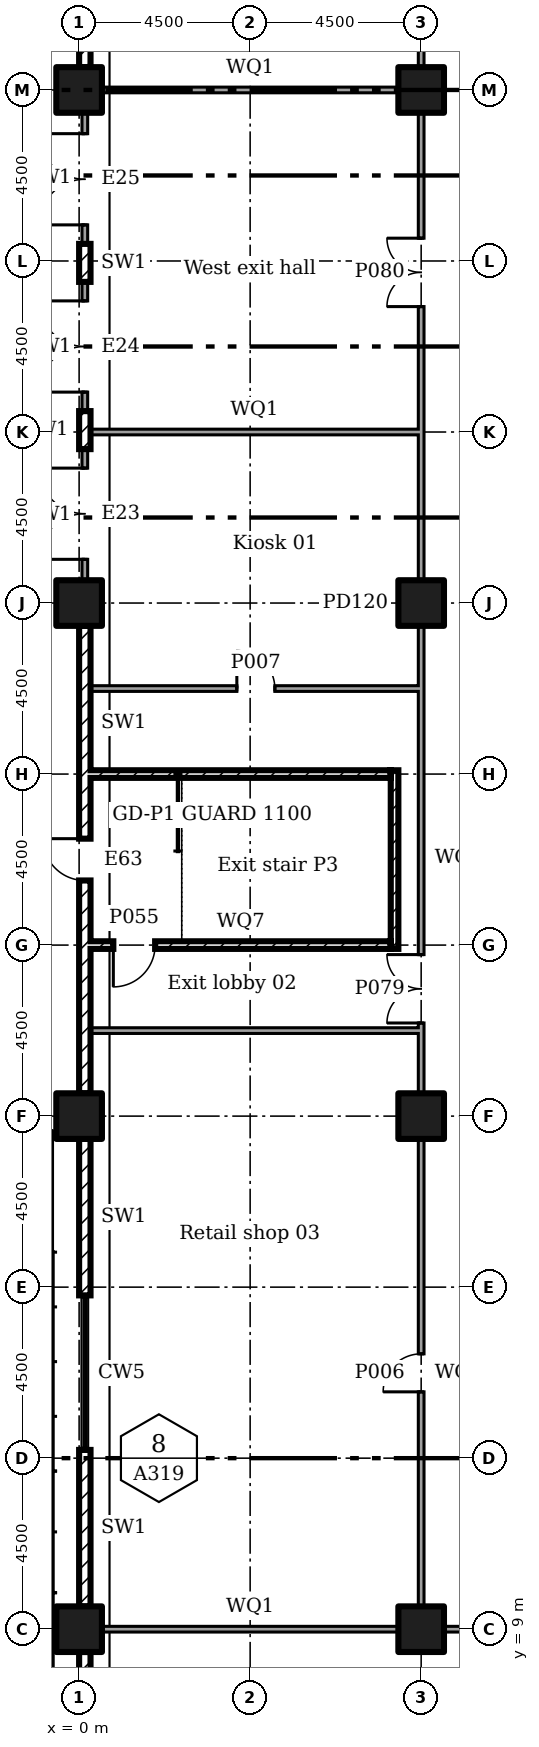
"""IFC4 building model, lengths in metres.
Left out: names, types, materials, properties, quantities, classifications, styles, units other than length and angle.
Written with IfcOpenShell. Run it as: python <this file> out.ifc"""

import sys

from ifc_helpers import new_model, si_unit, direction, frame, frame_2d, origin, origin_2d, place, context, subcontext, project, spatial, rectangle, extrude, element, fill, save


model = new_model("IFC4")
c1 = context("Model", 3, precision=1e-05, world=origin(), true_north=direction((0.0, 1.0)))
c2 = subcontext(c1, "Body", "Model", "MODEL_VIEW")
j1 = project(units=[si_unit("LENGTHUNIT", "METRE"), si_unit("PLANEANGLEUNIT", "RADIAN")], contexts=[c1])
p1 = place(None, origin())
s1 = spatial("IfcSite", under=j1, at=p1, CompositionType="ELEMENT")
p2 = place(p1, origin())
s2 = spatial("IfcBuilding", under=s1, at=p2, CompositionType="ELEMENT")
p3 = place(p2, origin())
s3 = spatial("IfcBuildingStorey", under=s2, at=p3, CompositionType="ELEMENT", Elevation=0.0)
for number, where in (
    (1, (0.0, 9.0, 0.0)),
    (2, (0.0, 22.5, 0.0)),
    (3, (0.0, 36.0, 0.0)),
    (4, (0.0, 49.5, 0.0)),
    (5, (9.0, 9.0, 0.0)),
    (6, (9.0, 22.5, 0.0)),
    (7, (9.0, 36.0, 0.0)),
    (8, (9.0, 49.5, 0.0)),
):
    element("IfcColumn", number, at=place(p3, frame(where)), inside=s3, PredefinedType="COLUMN", context=c2, shape_type="SweptSolid", body=[
        extrude(rectangle(XDim=1.2, YDim=1.2, at=origin_2d()), origin(), (0.0, 0.0, 1.0), 6.0),
    ])
p4 = place(p3, frame((0.15, 51.75, 0.0), z_axis=(0.0, 0.0, 1.0), x_axis=(0.0, -1.0, 0.0)))
e9 = element("IfcWall", 9, at=p4, inside=s3, PredefinedType="ELEMENTEDWALL", context=c2, shape_type="SweptSolid", body=[
    extrude(rectangle(XDim=1.65, YDim=0.3, at=frame_2d((0.825, 0.0))), origin(), (0.0, 0.0, 1.0), 5.55),
])
p5 = place(p3, frame((0.15, 48.9, 0.0), z_axis=(0.0, 0.0, 1.0), x_axis=(0.0, -1.0, 0.0)))
e10 = element("IfcWall", 10, at=p5, inside=s3, PredefinedType="SOLIDWALL", context=c2, shape_type="SweptSolid", body=[
    extrude(rectangle(XDim=3.45, YDim=0.15, at=frame_2d((1.725, 0.0))), origin(), (0.0, 0.0, 1.0), 5.55),
])
p6 = place(p5, frame((0.55, 0.0, 0.0)))
e11 = element("IfcOpeningElement", 11, at=p6, cuts=e10, PredefinedType="OPENING", context=c2, shape_type="SweptSolid", body=[
    extrude(rectangle(XDim=2.4, YDim=2.7, at=frame_2d((1.2, 1.35))), frame((0.0, 0.085, 0.0), z_axis=(0.0, -1.0, 0.0), x_axis=(1.0, 0.0, 0.0)), (0.0, 0.0, 1.0), 0.17),
])
p7 = place(p3, frame((0.15, 45.45, 0.0), z_axis=(0.0, 0.0, 1.0), x_axis=(0.0, -1.0, 0.0)))
e12 = element("IfcWall", 12, at=p7, inside=s3, PredefinedType="ELEMENTEDWALL", context=c2, shape_type="SweptSolid", body=[
    extrude(rectangle(XDim=1.0, YDim=0.3, at=frame_2d((0.5, 0.0))), origin(), (0.0, 0.0, 1.0), 5.55),
])
p8 = place(p3, frame((0.15, 44.45, 0.0), z_axis=(0.0, 0.0, 1.0), x_axis=(0.0, -1.0, 0.0)))
e13 = element("IfcWall", 13, at=p8, inside=s3, PredefinedType="SOLIDWALL", context=c2, shape_type="SweptSolid", body=[
    extrude(rectangle(XDim=3.4, YDim=0.15, at=frame_2d((1.7, 0.0))), origin(), (0.0, 0.0, 1.0), 5.55),
])
p9 = place(p8, frame((0.5, 0.0, 0.0)))
e14 = element("IfcOpeningElement", 14, at=p9, cuts=e13, PredefinedType="OPENING", context=c2, shape_type="SweptSolid", body=[
    extrude(rectangle(XDim=2.4, YDim=2.7, at=frame_2d((1.2, 1.35))), frame((0.0, 0.085, 0.0), z_axis=(0.0, -1.0, 0.0), x_axis=(1.0, 0.0, 0.0)), (0.0, 0.0, 1.0), 0.17),
])
p10 = place(p3, frame((0.15, 41.05, 0.0), z_axis=(0.0, 0.0, 1.0), x_axis=(0.0, -1.0, 0.0)))
e15 = element("IfcWall", 15, at=p10, inside=s3, PredefinedType="ELEMENTEDWALL", context=c2, shape_type="SweptSolid", body=[
    extrude(rectangle(XDim=1.0, YDim=0.3, at=frame_2d((0.5, 0.0))), origin(), (0.0, 0.0, 1.0), 5.55),
])
p11 = place(p3, frame((0.15, 40.05, 0.0), z_axis=(0.0, 0.0, 1.0), x_axis=(0.0, -1.0, 0.0)))
e16 = element("IfcWall", 16, at=p11, inside=s3, PredefinedType="SOLIDWALL", context=c2, shape_type="SweptSolid", body=[
    extrude(rectangle(XDim=3.45, YDim=0.15, at=frame_2d((1.725, 0.0))), origin(), (0.0, 0.0, 1.0), 5.55),
])
p12 = place(p11, frame((0.5, 0.0, 0.0)))
e17 = element("IfcOpeningElement", 17, at=p12, cuts=e16, PredefinedType="OPENING", context=c2, shape_type="SweptSolid", body=[
    extrude(rectangle(XDim=2.4, YDim=2.7, at=frame_2d((1.2, 1.35))), frame((0.0, 0.085, 0.0), z_axis=(0.0, -1.0, 0.0), x_axis=(1.0, 0.0, 0.0)), (0.0, 0.0, 1.0), 0.17),
])
p13 = place(p3, frame((0.15, 35.4, 0.0), z_axis=(0.0, 0.0, 1.0), x_axis=(0.0, -1.0, 0.0)))
e18 = element("IfcWall", 18, at=p13, inside=s3, PredefinedType="ELEMENTEDWALL", context=c2, shape_type="SweptSolid", body=[
    extrude(rectangle(XDim=5.1, YDim=0.3, at=frame_2d((2.55, 0.0))), origin(), (0.0, 0.0, 1.0), 5.55),
])
p14 = place(p3, frame((0.15, 30.3, 0.0), z_axis=(0.0, 0.0, 1.0), x_axis=(0.0, -1.0, 0.0)))
e19 = element("IfcWall", 19, at=p14, inside=s3, PredefinedType="ELEMENTEDWALL", context=c2, shape_type="SweptSolid", body=[
    extrude(rectangle(XDim=2.1, YDim=0.3, at=frame_2d((1.05, 0.0))), origin(), (0.0, 0.0, 1.0), 5.55),
])
p15 = place(p14, frame((0.5, 0.0, 0.0)))
e20 = element("IfcOpeningElement", 20, at=p15, cuts=e19, PredefinedType="OPENING", context=c2, shape_type="SweptSolid", body=[
    extrude(rectangle(XDim=1.1, YDim=2.4, at=frame_2d((0.55, 1.2))), frame((0.0, 0.16, 0.0), z_axis=(0.0, -1.0, 0.0), x_axis=(1.0, 0.0, 0.0)), (0.0, 0.0, 1.0), 0.32),
])
p16 = place(p3, frame((0.15, 28.2, 0.0), z_axis=(0.0, 0.0, 1.0), x_axis=(0.0, -1.0, 0.0)))
e21 = element("IfcWall", 21, at=p16, inside=s3, PredefinedType="ELEMENTEDWALL", context=c2, shape_type="SweptSolid", body=[
    extrude(rectangle(XDim=5.1, YDim=0.3, at=frame_2d((2.55, 0.0))), origin(), (0.0, 0.0, 1.0), 5.55),
])
for number, where, z_axis, x_axis in (
    (22, (0.15, 21.9, 0.0), (0.0, 0.0, 1.0), (0.0, -1.0, 0.0)),
    (23, (0.15, 13.717, 0.0), (0.0, 0.0, 1.0), (0.0, -1.0, 0.0)),
):
    element("IfcWall", number, at=place(p3, frame(where, z_axis=z_axis, x_axis=x_axis)), inside=s3, PredefinedType="ELEMENTEDWALL", context=c2, shape_type="SweptSolid", body=[
        extrude(rectangle(XDim=4.116, YDim=0.3, at=frame_2d((2.058, 0.0))), origin(), (0.0, 0.0, 1.0), 5.55),
    ])
p17 = place(p3, frame((0.15, 8.4, 0.0), z_axis=(0.0, 0.0, 1.0), x_axis=(0.0, -1.0, 0.0)))
e24 = element("IfcWall", 24, at=p17, inside=s3, PredefinedType="ELEMENTEDWALL", context=c2, shape_type="SweptSolid", body=[
    extrude(rectangle(XDim=3.9, YDim=0.3, at=frame_2d((1.95, 0.0))), origin(), (0.0, 0.0, 1.0), 5.55),
])
p18 = place(p3, frame((9.595, 9.0, 0.0)))
e25 = element("IfcWall", 25, at=p18, inside=s3, PredefinedType="PARTITIONING", context=c2, shape_type="SweptSolid", body=[
    extrude(rectangle(XDim=8.48, YDim=0.15, at=frame_2d((4.24, 0.0))), origin(), (0.0, 0.0, 1.0), 5.55),
])
p19 = place(p18, frame((3.7, 0.0, 0.0)))
e26 = element("IfcOpeningElement", 26, at=p19, cuts=e25, PredefinedType="OPENING", context=c2, shape_type="SweptSolid", body=[
    extrude(rectangle(XDim=1.0, YDim=2.1, at=frame_2d((0.5, 1.05))), frame((0.0, 0.085, 0.0), z_axis=(0.0, -1.0, 0.0), x_axis=(1.0, 0.0, 0.0)), (0.0, 0.0, 1.0), 0.17),
])
p20 = place(p3, frame((0.595, 9.0, 0.0)))
e27 = element("IfcWall", 27, at=p20, inside=s3, PredefinedType="PARTITIONING", context=c2, shape_type="SweptSolid", body=[
    extrude(rectangle(XDim=7.81, YDim=0.15, at=frame_2d((3.905, 0.0))), origin(), (0.0, 0.0, 1.0), 5.55),
])
p21 = place(p3, frame((9.0, 9.595, 0.0), z_axis=(0.0, 0.0, 1.0), x_axis=(0.0, 1.0, 0.0)))
e28 = element("IfcWall", 28, at=p21, inside=s3, PredefinedType="PARTITIONING", context=c2, shape_type="SweptSolid", body=[
    extrude(rectangle(XDim=12.31, YDim=0.15, at=frame_2d((6.155, 0.0))), origin(), (0.0, 0.0, 1.0), 5.55),
])
p22 = place(p21, frame((5.65, 0.0, 0.0)))
e29 = element("IfcOpeningElement", 29, at=p22, cuts=e28, PredefinedType="OPENING", context=c2, shape_type="SweptSolid", body=[
    extrude(rectangle(XDim=1.0, YDim=2.1, at=frame_2d((0.5, 1.05))), frame((0.0, 0.085, 0.0), z_axis=(0.0, -1.0, 0.0), x_axis=(1.0, 0.0, 0.0)), (0.0, 0.0, 1.0), 0.17),
])
p23 = place(p3, frame((9.0, 23.095, 0.0), z_axis=(0.0, 0.0, 1.0), x_axis=(0.0, 1.0, 0.0)))
e30 = element("IfcWall", 30, at=p23, inside=s3, PredefinedType="PARTITIONING", context=c2, shape_type="SweptSolid", body=[
    extrude(rectangle(XDim=1.73, YDim=0.15, at=frame_2d((0.865, 0.0))), origin(), (0.0, 0.0, 1.0), 5.55),
])
p24 = place(p3, frame((9.0, 24.75, 0.0), z_axis=(0.0, 0.0, 1.0), x_axis=(0.0, 1.0, 0.0)))
e31 = element("IfcWall", 31, at=p24, inside=s3, PredefinedType="PARTITIONING", context=c2, shape_type="SweptSolid", body=[
    extrude(rectangle(XDim=9.075, YDim=0.15, at=frame_2d((4.538, 0.0))), origin(), (0.0, 0.0, 1.0), 5.55),
])
p25 = place(p24, frame((0.2, 0.0, 0.0)))
e32 = element("IfcOpeningElement", 32, at=p25, cuts=e31, PredefinedType="OPENING", context=c2, shape_type="SweptSolid", body=[
    extrude(rectangle(XDim=1.8, YDim=2.1, at=frame_2d((0.9, 1.05))), frame((0.0, 0.085, 0.0), z_axis=(0.0, -1.0, 0.0), x_axis=(1.0, 0.0, 0.0)), (0.0, 0.0, 1.0), 0.17),
])
p26 = place(p3, frame((9.0, 33.75, 0.0), z_axis=(0.0, 0.0, 1.0), x_axis=(0.0, 1.0, 0.0)))
e33 = element("IfcWall", 33, at=p26, inside=s3, PredefinedType="PARTITIONING", context=c2, shape_type="SweptSolid", body=[
    extrude(rectangle(XDim=1.655, YDim=0.15, at=frame_2d((0.828, 0.0))), origin(), (0.0, 0.0, 1.0), 5.55),
])
p27 = place(p3, frame((9.0, 36.595, 0.0), z_axis=(0.0, 0.0, 1.0), x_axis=(0.0, 1.0, 0.0)))
e34 = element("IfcWall", 34, at=p27, inside=s3, PredefinedType="PARTITIONING", context=c2, shape_type="SweptSolid", body=[
    extrude(rectangle(XDim=3.98, YDim=0.15, at=frame_2d((1.99, 0.0))), origin(), (0.0, 0.0, 1.0), 5.55),
])
p28 = place(p3, frame((9.0, 40.5, 0.0), z_axis=(0.0, 0.0, 1.0), x_axis=(0.0, 1.0, 0.0)))
e35 = element("IfcWall", 35, at=p28, inside=s3, PredefinedType="PARTITIONING", context=c2, shape_type="SweptSolid", body=[
    extrude(rectangle(XDim=8.405, YDim=0.15, at=frame_2d((4.203, 0.0))), origin(), (0.0, 0.0, 1.0), 5.55),
])
p29 = place(p28, frame((3.3, 0.0, 0.0)))
e36 = element("IfcOpeningElement", 36, at=p29, cuts=e35, PredefinedType="OPENING", context=c2, shape_type="SweptSolid", body=[
    extrude(rectangle(XDim=1.8, YDim=2.1, at=frame_2d((0.9, 1.05))), frame((0.0, 0.085, 0.0), z_axis=(0.0, -1.0, 0.0), x_axis=(1.0, 0.0, 0.0)), (0.0, 0.0, 1.0), 0.17),
])
p30 = place(p3, frame((9.0, 50.095, 0.0), z_axis=(0.0, 0.0, 1.0), x_axis=(0.0, 1.0, 0.0)))
e37 = element("IfcWall", 37, at=p30, inside=s3, PredefinedType="PARTITIONING", context=c2, shape_type="SweptSolid", body=[
    extrude(rectangle(XDim=12.31, YDim=0.15, at=frame_2d((6.155, 0.0))), origin(), (0.0, 0.0, 1.0), 5.55),
])
p31 = place(p30, frame((5.65, 0.0, 0.0)))
e38 = element("IfcOpeningElement", 38, at=p31, cuts=e37, PredefinedType="OPENING", context=c2, shape_type="SweptSolid", body=[
    extrude(rectangle(XDim=1.0, YDim=2.1, at=frame_2d((0.5, 1.05))), frame((0.0, 0.085, 0.0), z_axis=(0.0, -1.0, 0.0), x_axis=(1.0, 0.0, 0.0)), (0.0, 0.0, 1.0), 0.17),
])
p32 = place(p3, frame((0.3, 24.75, 0.0)))
e39 = element("IfcWall", 39, at=p32, inside=s3, PredefinedType="PARTITIONING", context=c2, shape_type="SweptSolid", body=[
    extrude(rectangle(XDim=8.625, YDim=0.15, at=frame_2d((4.312, 0.0))), origin(), (0.0, 0.0, 1.0), 5.55),
])
p33 = place(p3, frame((0.3, 33.75, 0.0)))
e40 = element("IfcWall", 40, at=p33, inside=s3, PredefinedType="PARTITIONING", context=c2, shape_type="SweptSolid", body=[
    extrude(rectangle(XDim=8.625, YDim=0.15, at=frame_2d((4.312, 0.0))), origin(), (0.0, 0.0, 1.0), 5.55),
])
p34 = place(p33, frame((3.85, 0.0, 0.0)))
e41 = element("IfcOpeningElement", 41, at=p34, cuts=e40, PredefinedType="OPENING", context=c2, shape_type="SweptSolid", body=[
    extrude(rectangle(XDim=1.0, YDim=2.1, at=frame_2d((0.5, 1.05))), frame((0.0, 0.085, 0.0), z_axis=(0.0, -1.0, 0.0), x_axis=(1.0, 0.0, 0.0)), (0.0, 0.0, 1.0), 0.17),
])
p35 = place(p3, frame((8.3, 26.9, 0.0), z_axis=(0.0, 0.0, 1.0), x_axis=(0.0, 1.0, 0.0)))
e42 = element("IfcWall", 42, at=p35, inside=s3, PredefinedType="SOLIDWALL", context=c2, shape_type="SweptSolid", body=[
    extrude(rectangle(XDim=4.7, YDim=0.2, at=frame_2d((2.35, 0.0))), origin(), (0.0, 0.0, 1.0), 5.55),
])
p36 = place(p3, frame((0.3, 27.0, 0.0)))
e43 = element("IfcWall", 43, at=p36, inside=s3, PredefinedType="SOLIDWALL", context=c2, shape_type="SweptSolid", body=[
    extrude(rectangle(XDim=7.9, YDim=0.2, at=frame_2d((3.95, 0.0))), origin(), (0.0, 0.0, 1.0), 5.55),
])
p37 = place(p36, frame((0.6, 0.0, 0.0)))
e44 = element("IfcOpeningElement", 44, at=p37, cuts=e43, PredefinedType="OPENING", context=c2, shape_type="SweptSolid", body=[
    extrude(rectangle(XDim=1.1, YDim=2.1, at=frame_2d((0.55, 1.05))), frame((0.0, 0.11, 0.0), z_axis=(0.0, -1.0, 0.0), x_axis=(1.0, 0.0, 0.0)), (0.0, 0.0, 1.0), 0.22),
])
p38 = place(p3, frame((0.3, 31.5, 0.0)))
e45 = element("IfcWall", 45, at=p38, inside=s3, PredefinedType="SOLIDWALL", context=c2, shape_type="SweptSolid", body=[
    extrude(rectangle(XDim=7.9, YDim=0.2, at=frame_2d((3.95, 0.0))), origin(), (0.0, 0.0, 1.0), 5.55),
])
p39 = place(p3, frame((0.3, 40.5, 0.0)))
e46 = element("IfcWall", 46, at=p39, inside=s3, PredefinedType="PARTITIONING", context=c2, shape_type="SweptSolid", body=[
    extrude(rectangle(XDim=8.625, YDim=0.15, at=frame_2d((4.312, 0.0))), origin(), (0.0, 0.0, 1.0), 5.55),
])
p40 = place(p3, frame((0.595, 49.5, 0.0)))
e47 = element("IfcWall", 47, at=p40, inside=s3, PredefinedType="PARTITIONING", context=c2, shape_type="SweptSolid", body=[
    extrude(rectangle(XDim=7.81, YDim=0.15, at=frame_2d((3.905, 0.0))), origin(), (0.0, 0.0, 1.0), 5.55),
])
p41 = place(p6, frame((2.4, 0.0, 0.0), x_axis=(-1.0, 0.0, 0.0)))
e48 = element("IfcDoor", 48, at=p41, inside=s3, OperationType="DOUBLE_DOOR_DOUBLE_SWING", PredefinedType="NOTDEFINED", context=c2, shape_type="SweptSolid", body=[
    extrude(rectangle(XDim=2.4, YDim=2.7, at=frame_2d((1.2, 1.35))), frame((0.0, 0.025, 0.0), z_axis=(0.0, -1.0, 0.0), x_axis=(1.0, 0.0, 0.0)), (0.0, 0.0, 1.0), 0.05),
])
fill(e11, e48)
p42 = place(p9, frame((2.4, 0.0, 0.0), x_axis=(-1.0, 0.0, 0.0)))
e49 = element("IfcDoor", 49, at=p42, inside=s3, OperationType="DOUBLE_DOOR_DOUBLE_SWING", PredefinedType="NOTDEFINED", context=c2, shape_type="SweptSolid", body=[
    extrude(rectangle(XDim=2.4, YDim=2.7, at=frame_2d((1.2, 1.35))), frame((0.0, 0.025, 0.0), z_axis=(0.0, -1.0, 0.0), x_axis=(1.0, 0.0, 0.0)), (0.0, 0.0, 1.0), 0.05),
])
fill(e14, e49)
p43 = place(p12, frame((2.4, 0.0, 0.0), x_axis=(-1.0, 0.0, 0.0)))
e50 = element("IfcDoor", 50, at=p43, inside=s3, OperationType="DOUBLE_DOOR_DOUBLE_SWING", PredefinedType="NOTDEFINED", context=c2, shape_type="SweptSolid", body=[
    extrude(rectangle(XDim=2.4, YDim=2.7, at=frame_2d((1.2, 1.35))), frame((0.0, 0.025, 0.0), z_axis=(0.0, -1.0, 0.0), x_axis=(1.0, 0.0, 0.0)), (0.0, 0.0, 1.0), 0.05),
])
fill(e17, e50)
p44 = place(p15, frame((1.1, 0.0, 0.0), x_axis=(-1.0, 0.0, 0.0)))
e51 = element("IfcDoor", 51, at=p44, inside=s3, OperationType="SINGLE_SWING_LEFT", PredefinedType="NOTDEFINED", context=c2, shape_type="SweptSolid", body=[
    extrude(rectangle(XDim=1.1, YDim=2.4, at=frame_2d((0.55, 1.2))), frame((0.0, 0.025, 0.0), z_axis=(0.0, -1.0, 0.0), x_axis=(1.0, 0.0, 0.0)), (0.0, 0.0, 1.0), 0.05),
])
fill(e20, e51)
p45 = place(p22, origin())
e52 = element("IfcDoor", 52, at=p45, inside=s3, OperationType="SINGLE_SWING_RIGHT", PredefinedType="DOOR", context=c2, shape_type="SweptSolid", body=[
    extrude(rectangle(XDim=1.0, YDim=2.1, at=frame_2d((0.5, 1.05))), frame((0.0, 0.025, 0.0), z_axis=(0.0, -1.0, 0.0), x_axis=(1.0, 0.0, 0.0)), (0.0, 0.0, 1.0), 0.05),
])
fill(e29, e52)
p46 = place(p34, origin())
e53 = element("IfcDoor", 53, at=p46, inside=s3, OperationType="SINGLE_SWING_RIGHT", PredefinedType="DOOR", context=c2, shape_type="SweptSolid", body=[
    extrude(rectangle(XDim=1.0, YDim=2.1, at=frame_2d((0.5, 1.05))), frame((0.0, 0.025, 0.0), z_axis=(0.0, -1.0, 0.0), x_axis=(1.0, 0.0, 0.0)), (0.0, 0.0, 1.0), 0.05),
])
fill(e41, e53)
p47 = place(p37, frame((1.1, 0.0, 0.0), x_axis=(-1.0, 0.0, 0.0)))
e54 = element("IfcDoor", 54, at=p47, inside=s3, OperationType="SINGLE_SWING_LEFT", PredefinedType="DOOR", context=c2, shape_type="SweptSolid", body=[
    extrude(rectangle(XDim=1.1, YDim=2.1, at=frame_2d((0.55, 1.05))), frame((0.0, 0.025, 0.0), z_axis=(0.0, -1.0, 0.0), x_axis=(1.0, 0.0, 0.0)), (0.0, 0.0, 1.0), 0.05),
])
fill(e44, e54)
p48 = place(p25, origin())
e55 = element("IfcDoor", 55, at=p48, inside=s3, OperationType="DOUBLE_DOOR_SINGLE_SWING", PredefinedType="DOOR", context=c2, shape_type="SweptSolid", body=[
    extrude(rectangle(XDim=1.8, YDim=2.1, at=frame_2d((0.9, 1.05))), frame((0.0, 0.025, 0.0), z_axis=(0.0, -1.0, 0.0), x_axis=(1.0, 0.0, 0.0)), (0.0, 0.0, 1.0), 0.05),
])
fill(e32, e55)
p49 = place(p29, origin())
e56 = element("IfcDoor", 56, at=p49, inside=s3, OperationType="DOUBLE_DOOR_SINGLE_SWING", PredefinedType="DOOR", context=c2, shape_type="SweptSolid", body=[
    extrude(rectangle(XDim=1.8, YDim=2.1, at=frame_2d((0.9, 1.05))), frame((0.0, 0.025, 0.0), z_axis=(0.0, -1.0, 0.0), x_axis=(1.0, 0.0, 0.0)), (0.0, 0.0, 1.0), 0.05),
])
fill(e36, e56)
save(model, sys.argv[1])
